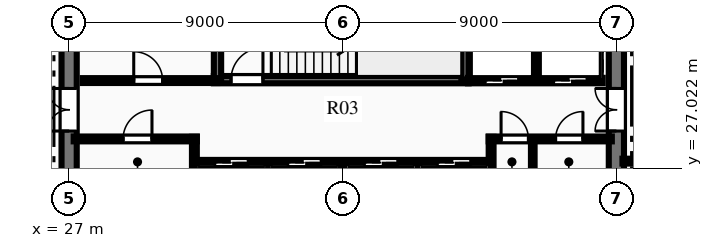
"""IFC4 building model, lengths in metres.
Left out: names, types, materials, properties, quantities, classifications, styles, units other than length and angle.
Written with IfcOpenShell. Run it as: python <this file> out.ifc"""

import sys

from ifc_helpers import new_model, si_unit, direction, frame, frame_2d, origin, place, context, subcontext, project, spatial, rectangle, extrude, element, fill, save


model = new_model("IFC4")
c1 = context("Model", 3, precision=1e-05, world=origin(), true_north=direction((0.0, 1.0)))
c2 = subcontext(c1, "Body", "Model", "MODEL_VIEW")
j1 = project(units=[si_unit("LENGTHUNIT", "METRE"), si_unit("PLANEANGLEUNIT", "RADIAN")], contexts=[c1])
p1 = place(None, origin())
s1 = spatial("IfcSite", under=j1, at=p1, CompositionType="ELEMENT")
p2 = place(p1, origin())
s2 = spatial("IfcBuilding", under=s1, at=p2, CompositionType="ELEMENT")
p3 = place(p2, frame((0.0, 0.0, 220.95)))
s3 = spatial("IfcBuildingStorey", under=s2, at=p3, CompositionType="ELEMENT", Elevation=220.95)
p4 = place(p3, frame((27.0, 18.25, 0.0), z_axis=(0.0, 0.0, 1.0), x_axis=(0.0, 1.0, 0.0)))
e1 = element("IfcWall", 1, at=p4, inside=s3, PredefinedType="SHEAR", context=c2, shape_type="SweptSolid", body=[
    extrude(rectangle(XDim=15.5, YDim=0.5, at=frame_2d((7.75, 0.0))), origin(), (0.0, 0.0, 1.0), 3.75),
])
p5 = place(p4, frame((9.99, 0.0, 0.0)))
e2 = element("IfcOpeningElement", 2, at=p5, cuts=e1, PredefinedType="OPENING", context=c2, shape_type="SweptSolid", body=[
    extrude(rectangle(XDim=1.4, YDim=2.2, at=frame_2d((0.7, 1.1))), frame((0.0, 0.26, 0.0), z_axis=(0.0, -1.0, 0.0), x_axis=(1.0, 0.0, 0.0)), (0.0, 0.0, 1.0), 0.52),
])
p6 = place(p3, frame((45.0, 18.25, 0.0), z_axis=(0.0, 0.0, 1.0), x_axis=(0.0, 1.0, 0.0)))
e3 = element("IfcWall", 3, at=p6, inside=s3, PredefinedType="SHEAR", context=c2, shape_type="SweptSolid", body=[
    extrude(rectangle(XDim=15.5, YDim=0.5, at=frame_2d((7.75, 0.0))), origin(), (0.0, 0.0, 1.0), 3.75),
])
p7 = place(p6, frame((9.99, 0.0, 0.0)))
e4 = element("IfcOpeningElement", 4, at=p7, cuts=e3, PredefinedType="OPENING", context=c2, shape_type="SweptSolid", body=[
    extrude(rectangle(XDim=1.4, YDim=2.2, at=frame_2d((0.7, 1.1))), frame((0.0, 0.26, 0.0), z_axis=(0.0, -1.0, 0.0), x_axis=(1.0, 0.0, 0.0)), (0.0, 0.0, 1.0), 0.52),
])
p8 = place(p3, frame((31.76, 29.93, 0.0), z_axis=(0.0, 0.0, 1.0), x_axis=(1.0, 0.0, 0.0)))
e5 = element("IfcWall", 5, at=p8, inside=s3, PredefinedType="SHEAR", context=c2, shape_type="SweptSolid", body=[
    extrude(rectangle(XDim=8.38, YDim=0.24, at=frame_2d((4.19, 0.0))), origin(), (0.0, 0.0, 1.0), 3.75),
])
p9 = place(p8, frame((0.565, 0.0, 0.0)))
e6 = element("IfcOpeningElement", 6, at=p9, cuts=e5, PredefinedType="OPENING", context=c2, shape_type="SweptSolid", body=[
    extrude(rectangle(XDim=1.05, YDim=2.15, at=frame_2d((0.525, 1.075))), frame((0.0, 0.13, 0.0), z_axis=(0.0, -1.0, 0.0), x_axis=(1.0, 0.0, 0.0)), (0.0, 0.0, 1.0), 0.26),
])
p10 = place(p3, frame((31.88, 29.93, 0.0), z_axis=(0.0, 0.0, 1.0), x_axis=(0.0, 1.0, 0.0)))
e7 = element("IfcWall", 7, at=p10, inside=s3, PredefinedType="SHEAR", context=c2, shape_type="SweptSolid", body=[
    extrude(rectangle(XDim=3.79, YDim=0.24, at=frame_2d((1.895, 0.0))), origin(), (0.0, 0.0, 1.0), 3.75),
])
p11 = place(p3, frame((40.02, 29.93, 0.0), z_axis=(0.0, 0.0, 1.0), x_axis=(0.0, 1.0, 0.0)))
e8 = element("IfcWall", 8, at=p11, inside=s3, PredefinedType="SHEAR", context=c2, shape_type="SweptSolid", body=[
    extrude(rectangle(XDim=3.85, YDim=0.24, at=frame_2d((1.925, 0.0))), origin(), (0.0, 0.0, 1.0), 3.75),
])
p12 = place(p3, frame((27.15, 27.98, 0.0), z_axis=(0.0, 0.0, 1.0), x_axis=(1.0, 0.0, 0.0)))
e9 = element("IfcWall", 9, at=p12, inside=s3, PredefinedType="PARTITIONING", context=c2, shape_type="SweptSolid", body=[
    extrude(rectangle(XDim=4.05, YDim=0.16, at=frame_2d((2.025, 0.0))), origin(), (0.0, 0.0, 1.0), 3.47),
])
p13 = place(p12, frame((1.625, 0.0, 0.0)))
e10 = element("IfcOpeningElement", 10, at=p13, cuts=e9, PredefinedType="OPENING", context=c2, shape_type="SweptSolid", body=[
    extrude(rectangle(XDim=0.95, YDim=2.15, at=frame_2d((0.475, 1.075))), frame((0.0, 0.09, 0.0), z_axis=(0.0, -1.0, 0.0), x_axis=(1.0, 0.0, 0.0)), (0.0, 0.0, 1.0), 0.18),
])
p14 = place(p3, frame((31.12, 26.54, 0.0), z_axis=(0.0, 0.0, 1.0), x_axis=(0.0, 1.0, 0.0)))
e11 = element("IfcWall", 11, at=p14, inside=s3, PredefinedType="PARTITIONING", context=c2, shape_type="SweptSolid", body=[
    extrude(rectangle(XDim=1.51, YDim=0.16, at=frame_2d((0.755, 0.0))), origin(), (0.0, 0.0, 1.0), 3.47),
])
p15 = place(p3, frame((40.8, 27.98, 0.0), z_axis=(0.0, 0.0, 1.0), x_axis=(1.0, 0.0, 0.0)))
e12 = element("IfcWall", 12, at=p15, inside=s3, PredefinedType="PARTITIONING", context=c2, shape_type="SweptSolid", body=[
    extrude(rectangle(XDim=4.05, YDim=0.16, at=frame_2d((2.025, 0.0))), origin(), (0.0, 0.0, 1.0), 3.47),
])
p16 = place(p15, frame((0.407, 0.0, 0.0)))
e13 = element("IfcOpeningElement", 13, at=p16, cuts=e12, PredefinedType="OPENING", context=c2, shape_type="SweptSolid", body=[
    extrude(rectangle(XDim=0.9, YDim=2.15, at=frame_2d((0.45, 1.075))), frame((0.0, 0.09, 0.0), z_axis=(0.0, -1.0, 0.0), x_axis=(1.0, 0.0, 0.0)), (0.0, 0.0, 1.0), 0.18),
])
p17 = place(p15, frame((2.2, 0.0, 0.0)))
e14 = element("IfcOpeningElement", 14, at=p17, cuts=e12, PredefinedType="OPENING", context=c2, shape_type="SweptSolid", body=[
    extrude(rectangle(XDim=0.9, YDim=2.15, at=frame_2d((0.45, 1.075))), frame((0.0, 0.09, 0.0), z_axis=(0.0, -1.0, 0.0), x_axis=(1.0, 0.0, 0.0)), (0.0, 0.0, 1.0), 0.18),
])
p18 = place(p3, frame((40.88, 26.54, 0.0), z_axis=(0.0, 0.0, 1.0), x_axis=(0.0, 1.0, 0.0)))
e15 = element("IfcWall", 15, at=p18, inside=s3, PredefinedType="PARTITIONING", context=c2, shape_type="SweptSolid", body=[
    extrude(rectangle(XDim=1.51, YDim=0.16, at=frame_2d((0.755, 0.0))), origin(), (0.0, 0.0, 1.0), 3.47),
])
p19 = place(p3, frame((42.25, 26.54, 0.0), z_axis=(0.0, 0.0, 1.0), x_axis=(0.0, 1.0, 0.0)))
e16 = element("IfcWall", 16, at=p19, inside=s3, PredefinedType="PARTITIONING", context=c2, shape_type="SweptSolid", body=[
    extrude(rectangle(XDim=1.44, YDim=0.12, at=frame_2d((0.72, 0.0))), origin(), (0.0, 0.0, 1.0), 3.47),
])
p20 = place(p3, frame((27.45, 29.9, 0.0), z_axis=(0.0, 0.0, 1.0), x_axis=(1.0, 0.0, 0.0)))
e17 = element("IfcWall", 17, at=p20, inside=s3, PredefinedType="PARTITIONING", context=c2, shape_type="SweptSolid", body=[
    extrude(rectangle(XDim=4.43, YDim=0.16, at=frame_2d((2.215, 0.0))), origin(), (0.0, 0.0, 1.0), 3.47),
])
p21 = place(p20, frame((1.675, 0.0, 0.0)))
e18 = element("IfcOpeningElement", 18, at=p21, cuts=e17, PredefinedType="OPENING", context=c2, shape_type="SweptSolid", body=[
    extrude(rectangle(XDim=0.95, YDim=2.15, at=frame_2d((0.475, 1.075))), frame((0.0, 0.09, 0.0), z_axis=(0.0, -1.0, 0.0), x_axis=(1.0, 0.0, 0.0)), (0.0, 0.0, 1.0), 0.18),
])
p22 = place(p3, frame((40.12, 29.9, 0.0), z_axis=(0.0, 0.0, 1.0), x_axis=(1.0, 0.0, 0.0)))
e19 = element("IfcWall", 19, at=p22, inside=s3, PredefinedType="PARTITIONING", context=c2, shape_type="SweptSolid", body=[
    extrude(rectangle(XDim=4.43, YDim=0.18, at=frame_2d((2.215, 0.0))), origin(), (0.0, 0.0, 1.0), 3.47),
])
p23 = place(p22, frame((0.565, 0.0, 0.0)))
e20 = element("IfcOpeningElement", 20, at=p23, cuts=e19, PredefinedType="OPENING", context=c2, shape_type="SweptSolid", body=[
    extrude(rectangle(XDim=1.1, YDim=2.15, at=frame_2d((0.55, 1.075))), frame((0.0, 0.1, 0.0), z_axis=(0.0, -1.0, 0.0), x_axis=(1.0, 0.0, 0.0)), (0.0, 0.0, 1.0), 0.2),
])
p24 = place(p22, frame((2.815, 0.0, 0.0)))
e21 = element("IfcOpeningElement", 21, at=p24, cuts=e19, PredefinedType="OPENING", context=c2, shape_type="SweptSolid", body=[
    extrude(rectangle(XDim=1.1, YDim=2.15, at=frame_2d((0.55, 1.075))), frame((0.0, 0.1, 0.0), z_axis=(0.0, -1.0, 0.0), x_axis=(1.0, 0.0, 0.0)), (0.0, 0.0, 1.0), 0.2),
])
p25 = place(p3, frame((42.37, 29.9, 0.0), z_axis=(0.0, 0.0, 1.0), x_axis=(0.0, 1.0, 0.0)))
e22 = element("IfcWall", 22, at=p25, inside=s3, PredefinedType="PARTITIONING", context=c2, shape_type="SweptSolid", body=[
    extrude(rectangle(XDim=3.75, YDim=0.18, at=frame_2d((1.875, 0.0))), origin(), (0.0, 0.0, 1.0), 3.47),
])
p26 = place(p3, frame((31.2, 27.2, 0.0), z_axis=(0.0, 0.0, 1.0), x_axis=(1.0, 0.0, 0.0)))
e23 = element("IfcWall", 23, at=p26, inside=s3, PredefinedType="PARTITIONING", context=c2, shape_type="SweptSolid", body=[
    extrude(rectangle(XDim=9.6, YDim=0.18, at=frame_2d((4.8, 0.0))), origin(), (0.0, 0.0, 1.0), 3.47),
])
p27 = place(p26, frame((0.59, 0.0, 0.0)))
e24 = element("IfcOpeningElement", 24, at=p27, cuts=e23, PredefinedType="OPENING", context=c2, shape_type="SweptSolid", body=[
    extrude(rectangle(XDim=1.1, YDim=2.15, at=frame_2d((0.55, 1.075))), frame((0.0, 0.1, 0.0), z_axis=(0.0, -1.0, 0.0), x_axis=(1.0, 0.0, 0.0)), (0.0, 0.0, 1.0), 0.2),
])
p28 = place(p26, frame((2.99, 0.0, 0.0)))
e25 = element("IfcOpeningElement", 25, at=p28, cuts=e23, PredefinedType="OPENING", context=c2, shape_type="SweptSolid", body=[
    extrude(rectangle(XDim=1.1, YDim=2.15, at=frame_2d((0.55, 1.075))), frame((0.0, 0.1, 0.0), z_axis=(0.0, -1.0, 0.0), x_axis=(1.0, 0.0, 0.0)), (0.0, 0.0, 1.0), 0.2),
])
p29 = place(p26, frame((5.51, 0.0, 0.0)))
e26 = element("IfcOpeningElement", 26, at=p29, cuts=e23, PredefinedType="OPENING", context=c2, shape_type="SweptSolid", body=[
    extrude(rectangle(XDim=1.1, YDim=2.15, at=frame_2d((0.55, 1.075))), frame((0.0, 0.1, 0.0), z_axis=(0.0, -1.0, 0.0), x_axis=(1.0, 0.0, 0.0)), (0.0, 0.0, 1.0), 0.2),
])
p30 = place(p26, frame((7.91, 0.0, 0.0)))
e27 = element("IfcOpeningElement", 27, at=p30, cuts=e23, PredefinedType="OPENING", context=c2, shape_type="SweptSolid", body=[
    extrude(rectangle(XDim=1.1, YDim=2.15, at=frame_2d((0.55, 1.075))), frame((0.0, 0.1, 0.0), z_axis=(0.0, -1.0, 0.0), x_axis=(1.0, 0.0, 0.0)), (0.0, 0.0, 1.0), 0.2),
])
for number, where, z_axis, x_axis in (
    (28, (33.54, 25.3, 0.0), (0.0, 0.0, 1.0), (0.0, 1.0, 0.0)),
    (29, (36.0, 25.3, 0.0), (0.0, 0.0, 1.0), (0.0, 1.0, 0.0)),
    (30, (38.46, 25.3, 0.0), (0.0, 0.0, 1.0), (0.0, 1.0, 0.0)),
):
    element("IfcWall", number, at=place(p3, frame(where, z_axis=z_axis, x_axis=x_axis)), inside=s3, PredefinedType="PARTITIONING", context=c2, shape_type="SweptSolid", body=[
        extrude(rectangle(XDim=1.9, YDim=0.18, at=frame_2d((0.95, 0.0))), origin(), (0.0, 0.0, 1.0), 3.47),
    ])
p31 = place(p3, frame((45.2, 27.25, 0.0), z_axis=(0.0, 0.0, 1.0), x_axis=(1.0, 0.0, 0.0)))
e31 = element("IfcWall", 31, at=p31, inside=s3, PredefinedType="PARTITIONING", context=c2, shape_type="SweptSolid", body=[
    extrude(rectangle(XDim=2.25, YDim=0.16, at=frame_2d((1.125, 0.0))), origin(), (0.0, 0.0, 1.0), 3.47),
])
p32 = place(p13, origin())
e32 = element("IfcDoor", 32, at=p32, inside=s3, OperationType="SINGLE_SWING_RIGHT", PredefinedType="DOOR", context=c2, shape_type="SweptSolid", body=[
    extrude(rectangle(XDim=0.95, YDim=2.15, at=frame_2d((0.475, 1.075))), frame((0.0, 0.025, 0.0), z_axis=(0.0, -1.0, 0.0), x_axis=(1.0, 0.0, 0.0)), (0.0, 0.0, 1.0), 0.05),
])
fill(e10, e32)
p33 = place(p16, origin())
e33 = element("IfcDoor", 33, at=p33, inside=s3, OperationType="SINGLE_SWING_LEFT", PredefinedType="DOOR", context=c2, shape_type="SweptSolid", body=[
    extrude(rectangle(XDim=0.9, YDim=2.15, at=frame_2d((0.45, 1.075))), frame((0.0, 0.025, 0.0), z_axis=(0.0, -1.0, 0.0), x_axis=(1.0, 0.0, 0.0)), (0.0, 0.0, 1.0), 0.05),
])
fill(e13, e33)
p34 = place(p17, origin())
e34 = element("IfcDoor", 34, at=p34, inside=s3, OperationType="SINGLE_SWING_RIGHT", PredefinedType="DOOR", context=c2, shape_type="SweptSolid", body=[
    extrude(rectangle(XDim=0.9, YDim=2.15, at=frame_2d((0.45, 1.075))), frame((0.0, 0.025, 0.0), z_axis=(0.0, -1.0, 0.0), x_axis=(1.0, 0.0, 0.0)), (0.0, 0.0, 1.0), 0.05),
])
fill(e14, e34)
p35 = place(p21, origin())
e35 = element("IfcDoor", 35, at=p35, inside=s3, OperationType="SINGLE_SWING_LEFT", PredefinedType="DOOR", context=c2, shape_type="SweptSolid", body=[
    extrude(rectangle(XDim=0.95, YDim=2.15, at=frame_2d((0.475, 1.075))), frame((0.0, 0.025, 0.0), z_axis=(0.0, -1.0, 0.0), x_axis=(1.0, 0.0, 0.0)), (0.0, 0.0, 1.0), 0.05),
])
fill(e18, e35)
p36 = place(p9, origin())
e36 = element("IfcDoor", 36, at=p36, inside=s3, OperationType="SINGLE_SWING_RIGHT", PredefinedType="DOOR", context=c2, shape_type="SweptSolid", body=[
    extrude(rectangle(XDim=1.05, YDim=2.15, at=frame_2d((0.525, 1.075))), frame((0.0, 0.025, 0.0), z_axis=(0.0, -1.0, 0.0), x_axis=(1.0, 0.0, 0.0)), (0.0, 0.0, 1.0), 0.05),
])
fill(e6, e36)
p37 = place(p5, origin())
e37 = element("IfcDoor", 37, at=p37, inside=s3, OperationType="DOUBLE_DOOR_SINGLE_SWING", PredefinedType="DOOR", context=c2, shape_type="SweptSolid", body=[
    extrude(rectangle(XDim=1.4, YDim=2.2, at=frame_2d((0.7, 1.1))), frame((0.0, 0.025, 0.0), z_axis=(0.0, -1.0, 0.0), x_axis=(1.0, 0.0, 0.0)), (0.0, 0.0, 1.0), 0.05),
])
fill(e2, e37)
p38 = place(p7, origin())
e38 = element("IfcDoor", 38, at=p38, inside=s3, OperationType="DOUBLE_DOOR_SINGLE_SWING", PredefinedType="DOOR", context=c2, shape_type="SweptSolid", body=[
    extrude(rectangle(XDim=1.4, YDim=2.2, at=frame_2d((0.7, 1.1))), frame((0.0, 0.025, 0.0), z_axis=(0.0, -1.0, 0.0), x_axis=(1.0, 0.0, 0.0)), (0.0, 0.0, 1.0), 0.05),
])
fill(e4, e38)
p39 = place(p23, origin())
e39 = element("IfcDoor", 39, at=p39, inside=s3, OperationType="SLIDING_TO_LEFT", PredefinedType="DOOR", context=c2, shape_type="SweptSolid", body=[
    extrude(rectangle(XDim=1.1, YDim=2.15, at=frame_2d((0.55, 1.075))), frame((0.0, 0.025, 0.0), z_axis=(0.0, -1.0, 0.0), x_axis=(1.0, 0.0, 0.0)), (0.0, 0.0, 1.0), 0.05),
])
fill(e20, e39)
p40 = place(p24, origin())
e40 = element("IfcDoor", 40, at=p40, inside=s3, OperationType="SLIDING_TO_LEFT", PredefinedType="DOOR", context=c2, shape_type="SweptSolid", body=[
    extrude(rectangle(XDim=1.1, YDim=2.15, at=frame_2d((0.55, 1.075))), frame((0.0, 0.025, 0.0), z_axis=(0.0, -1.0, 0.0), x_axis=(1.0, 0.0, 0.0)), (0.0, 0.0, 1.0), 0.05),
])
fill(e21, e40)
p41 = place(p27, origin())
e41 = element("IfcDoor", 41, at=p41, inside=s3, OperationType="SLIDING_TO_LEFT", PredefinedType="DOOR", context=c2, shape_type="SweptSolid", body=[
    extrude(rectangle(XDim=1.1, YDim=2.15, at=frame_2d((0.55, 1.075))), frame((0.0, 0.025, 0.0), z_axis=(0.0, -1.0, 0.0), x_axis=(1.0, 0.0, 0.0)), (0.0, 0.0, 1.0), 0.05),
])
fill(e24, e41)
p42 = place(p28, origin())
e42 = element("IfcDoor", 42, at=p42, inside=s3, OperationType="SLIDING_TO_LEFT", PredefinedType="DOOR", context=c2, shape_type="SweptSolid", body=[
    extrude(rectangle(XDim=1.1, YDim=2.15, at=frame_2d((0.55, 1.075))), frame((0.0, 0.025, 0.0), z_axis=(0.0, -1.0, 0.0), x_axis=(1.0, 0.0, 0.0)), (0.0, 0.0, 1.0), 0.05),
])
fill(e25, e42)
p43 = place(p29, origin())
e43 = element("IfcDoor", 43, at=p43, inside=s3, OperationType="SLIDING_TO_LEFT", PredefinedType="DOOR", context=c2, shape_type="SweptSolid", body=[
    extrude(rectangle(XDim=1.1, YDim=2.15, at=frame_2d((0.55, 1.075))), frame((0.0, 0.025, 0.0), z_axis=(0.0, -1.0, 0.0), x_axis=(1.0, 0.0, 0.0)), (0.0, 0.0, 1.0), 0.05),
])
fill(e26, e43)
p44 = place(p30, origin())
e44 = element("IfcDoor", 44, at=p44, inside=s3, OperationType="SLIDING_TO_LEFT", PredefinedType="DOOR", context=c2, shape_type="SweptSolid", body=[
    extrude(rectangle(XDim=1.1, YDim=2.15, at=frame_2d((0.55, 1.075))), frame((0.0, 0.025, 0.0), z_axis=(0.0, -1.0, 0.0), x_axis=(1.0, 0.0, 0.0)), (0.0, 0.0, 1.0), 0.05),
])
fill(e27, e44)
save(model, sys.argv[1])
